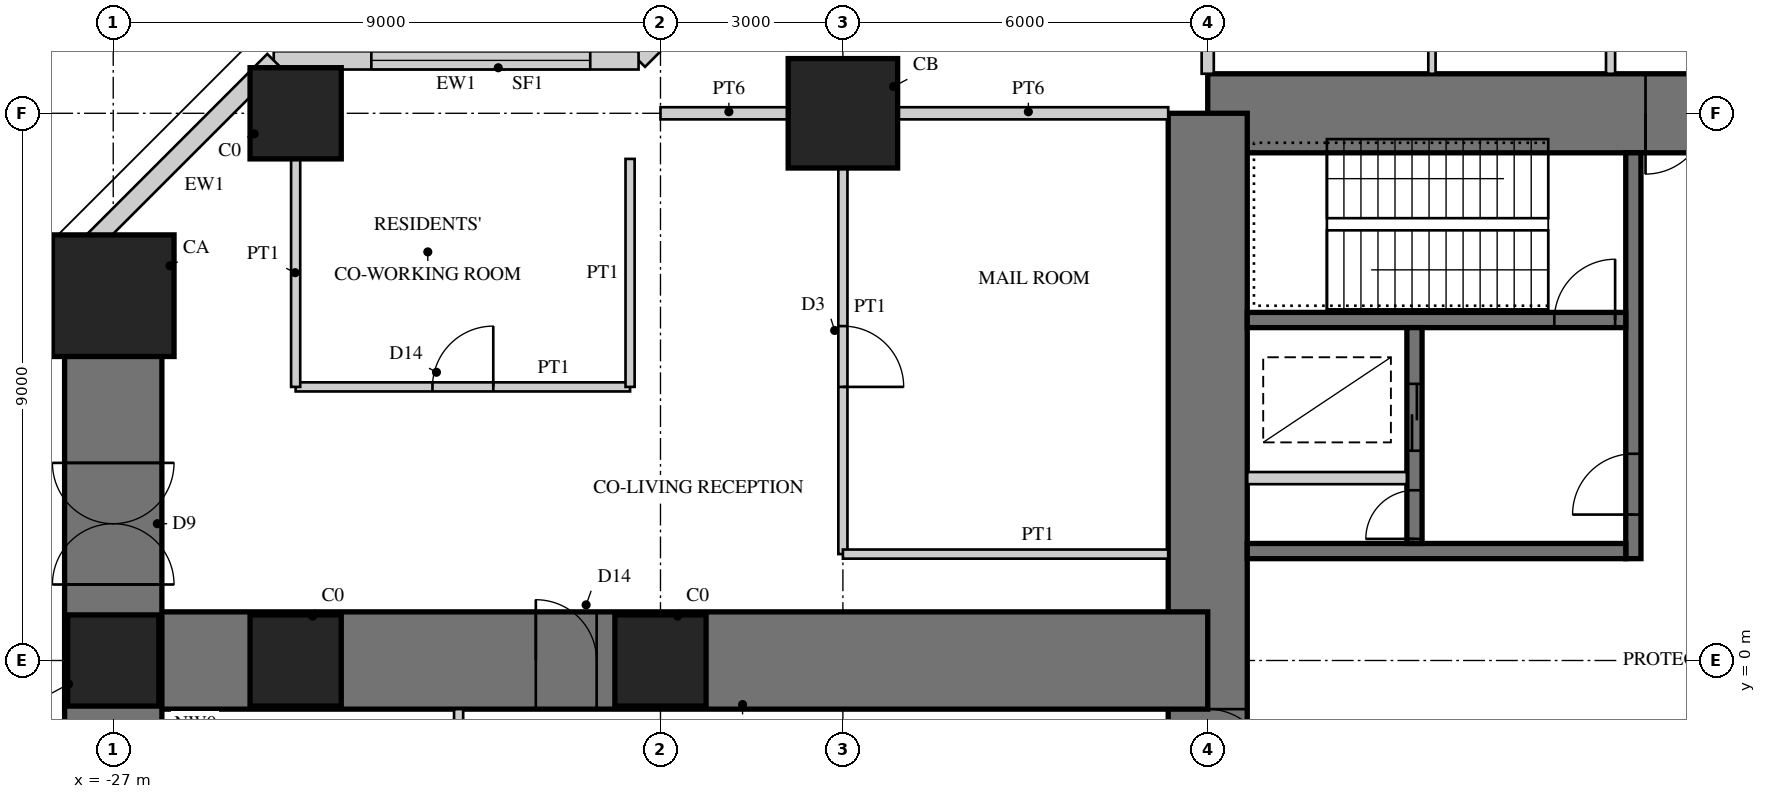
"""IFC4 building model, lengths in metres.
Left out: names, types, materials, properties, quantities, classifications, styles, units other than length and angle.
Written with IfcOpenShell. Run it as: python <this file> out.ifc"""

import sys

from ifc_helpers import new_model, si_unit, direction, frame, frame_2d, origin, origin_2d, place, context, subcontext, project, spatial, rectangle, hollow_rectangle, extrude, element, fill, save


model = new_model("IFC4")
c1 = context("Model", 3, precision=1e-05, world=origin(), true_north=direction((0.0, 1.0)))
c2 = subcontext(c1, "Body", "Model", "MODEL_VIEW")
j1 = project(units=[si_unit("LENGTHUNIT", "METRE"), si_unit("PLANEANGLEUNIT", "RADIAN")], contexts=[c1])
p1 = place(None, origin())
s1 = spatial("IfcSite", under=j1, at=p1, CompositionType="ELEMENT")
p2 = place(p1, origin())
s2 = spatial("IfcBuilding", under=s1, at=p2, CompositionType="ELEMENT")
p3 = place(p2, origin())
s3 = spatial("IfcBuildingStorey", under=s2, at=p3, CompositionType="ELEMENT", Elevation=0.0)
p4 = place(p3, frame((9.0, 9.0, 0.0), z_axis=(0.0, 0.0, 1.0), x_axis=(-1.0, 0.0, 0.0)))
e1 = element("IfcWall", 1, at=p4, inside=s3, PredefinedType="SHEAR", context=c2, shape_type="SweptSolid", body=[
    extrude(rectangle(XDim=18.0, YDim=1.3, at=frame_2d((9.0, 0.0))), origin(), (0.0, 0.0, 1.0), 5.0),
])
p5 = place(p4, frame((9.8, 0.0, 0.0)))
e2 = element("IfcOpeningElement", 2, at=p5, cuts=e1, PredefinedType="OPENING", context=c2, shape_type="SweptSolid", body=[
    extrude(rectangle(XDim=1.0, YDim=2.4, at=frame_2d((0.5, 1.2))), frame((0.0, 0.66, 0.0), z_axis=(0.0, -1.0, 0.0), x_axis=(1.0, 0.0, 0.0)), (0.0, 0.0, 1.0), 1.32),
])
p6 = place(p3, frame((-9.0, 9.0, 0.0), z_axis=(0.0, 0.0, 1.0), x_axis=(0.0, -1.0, 0.0)))
e3 = element("IfcWall", 3, at=p6, inside=s3, PredefinedType="SHEAR", context=c2, shape_type="SweptSolid", body=[
    extrude(rectangle(XDim=18.0, YDim=1.3, at=frame_2d((9.0, 0.0))), origin(), (0.0, 0.0, 1.0), 5.0),
])
p7 = place(p6, frame((9.8, 0.0, 0.0)))
e4 = element("IfcOpeningElement", 4, at=p7, cuts=e3, PredefinedType="OPENING", context=c2, shape_type="SweptSolid", body=[
    extrude(rectangle(XDim=1.0, YDim=2.4, at=frame_2d((0.5, 1.2))), frame((0.0, 0.66, 0.0), z_axis=(0.0, -1.0, 0.0), x_axis=(1.0, 0.0, 0.0)), (0.0, 0.0, 1.0), 1.32),
])
p8 = place(p3, frame((-2.0, 1.675, 0.0), z_axis=(0.0, 0.0, 1.0), x_axis=(0.0, 1.0, 0.0)))
e5 = element("IfcWall", 5, at=p8, inside=s3, PredefinedType="SHEAR", context=c2, shape_type="SweptSolid", body=[
    extrude(rectangle(XDim=6.675, YDim=0.25, at=frame_2d((3.337, 0.0))), origin(), (0.0, 0.0, 1.0), 5.0),
])
p9 = place(p8, frame((0.725, 0.0, 0.0)))
e6 = element("IfcOpeningElement", 6, at=p9, cuts=e5, PredefinedType="OPENING", context=c2, shape_type="SweptSolid", body=[
    extrude(rectangle(XDim=1.0, YDim=2.1, at=frame_2d((0.5, 1.05))), frame((0.0, 0.135, 0.0), z_axis=(0.0, -1.0, 0.0), x_axis=(1.0, 0.0, 0.0)), (0.0, 0.0, 1.0), 0.27),
])
p10 = place(p3, frame((-2.125, 1.8, 0.0), z_axis=(0.0, 0.0, 1.0), x_axis=(-1.0, 0.0, 0.0)))
e7 = element("IfcWall", 7, at=p10, inside=s3, PredefinedType="SHEAR", context=c2, shape_type="SweptSolid", body=[
    extrude(rectangle(XDim=6.225, YDim=0.25, at=frame_2d((3.113, 0.0))), origin(), (0.0, 0.0, 1.0), 5.0),
])
p11 = place(p3, frame((-2.125, 5.6, 0.0), z_axis=(0.0, 0.0, 1.0), x_axis=(-1.0, 0.0, 0.0)))
e8 = element("IfcWall", 8, at=p11, inside=s3, PredefinedType="SHEAR", context=c2, shape_type="SweptSolid", body=[
    extrude(rectangle(XDim=6.225, YDim=0.25, at=frame_2d((3.113, 0.0))), origin(), (0.0, 0.0, 1.0), 5.0),
])
p12 = place(p11, frame((0.175, 0.0, 0.0)))
e9 = element("IfcOpeningElement", 9, at=p12, cuts=e8, PredefinedType="OPENING", context=c2, shape_type="SweptSolid", body=[
    extrude(rectangle(XDim=1.0, YDim=2.1, at=frame_2d((0.5, 1.05))), frame((0.0, 0.135, 0.0), z_axis=(0.0, -1.0, 0.0), x_axis=(1.0, 0.0, 0.0)), (0.0, 0.0, 1.0), 0.27),
])
p13 = place(p3, frame((-5.6, 1.925, 0.0), z_axis=(0.0, 0.0, 1.0), x_axis=(0.0, 1.0, 0.0)))
e10 = element("IfcWall", 10, at=p13, inside=s3, PredefinedType="SHEAR", context=c2, shape_type="SweptSolid", body=[
    extrude(rectangle(XDim=3.55, YDim=0.25, at=frame_2d((1.775, 0.0))), origin(), (0.0, 0.0, 1.0), 5.0),
])
p14 = place(p13, frame((1.525, 0.0, 0.0)))
e11 = element("IfcOpeningElement", 11, at=p14, cuts=e10, PredefinedType="OPENING", context=c2, shape_type="SweptSolid", body=[
    extrude(rectangle(XDim=1.1, YDim=2.2, at=frame_2d((0.55, 1.1))), frame((0.0, 0.135, 0.0), z_axis=(0.0, -1.0, 0.0), x_axis=(1.0, 0.0, 0.0)), (0.0, 0.0, 1.0), 0.27),
])
p15 = place(p13, frame((0.075, 0.0, 0.0)))
e12 = element("IfcOpeningElement", 12, at=p15, cuts=e10, PredefinedType="OPENING", context=c2, shape_type="SweptSolid", body=[
    extrude(rectangle(XDim=0.8, YDim=2.1, at=frame_2d((0.4, 1.05))), frame((0.0, 0.135, 0.0), z_axis=(0.0, -1.0, 0.0), x_axis=(1.0, 0.0, 0.0)), (0.0, 0.0, 1.0), 0.27),
])
p16 = place(p3, frame((-5.725, 3.0, 0.0), z_axis=(0.0, 0.0, 1.0), x_axis=(-1.0, 0.0, 0.0)))
e13 = element("IfcWall", 13, at=p16, inside=s3, PredefinedType="PARTITIONING", context=c2, shape_type="SweptSolid", body=[
    extrude(rectangle(XDim=2.625, YDim=0.2, at=frame_2d((1.312, 0.0))), origin(), (0.0, 0.0, 1.0), 5.0),
])
p17 = place(p3, frame((-9.0, 0.0, 0.0), z_axis=(0.0, 0.0, 1.0), x_axis=(-1.0, 0.0, 0.0)))
e14 = element("IfcWall", 14, at=p17, inside=s3, PredefinedType="SHEAR", context=c2, shape_type="SweptSolid", body=[
    extrude(rectangle(XDim=18.0, YDim=1.6, at=frame_2d((9.0, 0.0))), origin(), (0.0, 0.0, 1.0), 5.0),
])
p18 = place(p17, frame((10.05, 0.0, 0.0)))
e15 = element("IfcOpeningElement", 15, at=p18, cuts=e14, PredefinedType="OPENING", context=c2, shape_type="SweptSolid", body=[
    extrude(rectangle(XDim=1.0, YDim=2.2, at=frame_2d((0.5, 1.1))), frame((0.0, 0.81, 0.0), z_axis=(0.0, -1.0, 0.0), x_axis=(1.0, 0.0, 0.0)), (0.0, 0.0, 1.0), 1.62),
])
p19 = place(p3, frame((-27.0, 6.0, 0.0), z_axis=(0.0, 0.0, 1.0), x_axis=(0.0, -1.0, 0.0)))
e16 = element("IfcWall", 16, at=p19, inside=s3, PredefinedType="SHEAR", context=c2, shape_type="SweptSolid", body=[
    extrude(rectangle(XDim=12.0, YDim=1.6, at=frame_2d((6.0, 0.0))), origin(), (0.0, 0.0, 1.0), 5.0),
])
p20 = place(p19, frame((2.75, 0.0, 0.0)))
e17 = element("IfcOpeningElement", 17, at=p20, cuts=e16, PredefinedType="OPENING", context=c2, shape_type="SweptSolid", body=[
    extrude(rectangle(XDim=2.0, YDim=2.6, at=frame_2d((1.0, 1.3))), frame((0.0, 0.81, 0.0), z_axis=(0.0, -1.0, 0.0), x_axis=(1.0, 0.0, 0.0)), (0.0, 0.0, 1.0), 1.62),
])
p21 = place(p19, frame((7.6, 0.0, 0.6)))
e18 = element("IfcOpeningElement", 18, at=p21, cuts=e16, PredefinedType="OPENING", context=c2, shape_type="SweptSolid", body=[
    extrude(rectangle(XDim=2.4, YDim=3.0, at=frame_2d((1.2, 1.5))), frame((0.0, 0.81, 0.0), z_axis=(0.0, -1.0, 0.0), x_axis=(1.0, 0.0, 0.0)), (0.0, 0.0, 1.0), 1.62),
])
p22 = place(p3, frame((-15.0, 9.0, 0.0), z_axis=(0.0, 0.0, 1.0), x_axis=(1.0, 0.0, 0.0)))
e19 = element("IfcColumn", 19, at=p22, inside=s3, PredefinedType="COLUMN", context=c2, shape_type="SweptSolid", body=[
    extrude(rectangle(XDim=1.8, YDim=1.8, at=origin_2d()), origin(), (0.0, 0.0, 1.0), 5.0),
])
p23 = place(p3, frame((-24.0, 9.0, 0.0), z_axis=(0.0, 0.0, 1.0), x_axis=(1.0, 0.0, 0.0)))
e20 = element("IfcColumn", 20, at=p23, inside=s3, PredefinedType="COLUMN", context=c2, shape_type="SweptSolid", body=[
    extrude(rectangle(XDim=1.5, YDim=1.5, at=origin_2d()), origin(), (0.0, 0.0, 1.0), 5.0),
])
p24 = place(p3, frame((-27.0, 6.0, 0.0), z_axis=(0.0, 0.0, 1.0), x_axis=(1.0, 0.0, 0.0)))
e21 = element("IfcColumn", 21, at=p24, inside=s3, PredefinedType="COLUMN", context=c2, shape_type="SweptSolid", body=[
    extrude(rectangle(XDim=2.0, YDim=2.0, at=origin_2d()), origin(), (0.0, 0.0, 1.0), 5.0),
])
for number, where, z_axis, x_axis in (
    (22, (-27.0, 0.0, 0.0), (0.0, 0.0, 1.0), (1.0, 0.0, 0.0)),
    (23, (-18.0, 0.0, 0.0), (0.0, 0.0, 1.0), (1.0, 0.0, 0.0)),
    (24, (-24.0, 0.0, 0.0), (0.0, 0.0, 1.0), (1.0, 0.0, 0.0)),
):
    element("IfcColumn", number, at=place(p3, frame(where, z_axis=z_axis, x_axis=x_axis)), inside=s3, PredefinedType="COLUMN", context=c2, shape_type="SweptSolid", body=[
        extrude(rectangle(XDim=1.5, YDim=1.5, at=origin_2d()), origin(), (0.0, 0.0, 1.0), 5.0),
    ])
p25 = place(p3, frame((-9.87, 18.36, 0.0), z_axis=(0.0, 0.0, 1.0), x_axis=(-0.707106781187, -0.707106781187, 0.0)))
e25 = element("IfcWall", 25, at=p25, inside=s3, PredefinedType="SOLIDWALL", context=c2, shape_type="SweptSolid", body=[
    extrude(rectangle(XDim=12.007, YDim=0.3, at=frame_2d((6.003, 0.0))), origin(), (0.0, 0.0, 1.0), 4.8),
])
p26 = place(p25, frame((1.204, 0.0, 0.0)))
e26 = element("IfcOpeningElement", 26, at=p26, cuts=e25, PredefinedType="OPENING", context=c2, shape_type="SweptSolid", body=[
    extrude(rectangle(XDim=3.6, YDim=4.2, at=frame_2d((1.8, 2.1))), frame((0.0, 0.16, 0.0), z_axis=(0.0, -1.0, 0.0), x_axis=(1.0, 0.0, 0.0)), (0.0, 0.0, 1.0), 0.32),
])
p27 = place(p3, frame((-18.36, 9.87, 0.0), z_axis=(0.0, 0.0, 1.0), x_axis=(-1.0, 0.0, 0.0)))
e27 = element("IfcWall", 27, at=p27, inside=s3, PredefinedType="SOLIDWALL", context=c2, shape_type="SweptSolid", body=[
    extrude(rectangle(XDim=6.0, YDim=0.3, at=frame_2d((3.0, 0.0))), origin(), (0.0, 0.0, 1.0), 4.8),
])
p28 = place(p27, frame((0.795, 0.0, 0.3)))
e28 = element("IfcOpeningElement", 28, at=p28, cuts=e27, PredefinedType="OPENING", context=c2, shape_type="SweptSolid", body=[
    extrude(rectangle(XDim=3.6, YDim=3.9, at=frame_2d((1.8, 1.95))), frame((0.0, 0.16, 0.0), z_axis=(0.0, -1.0, 0.0), x_axis=(1.0, 0.0, 0.0)), (0.0, 0.0, 1.0), 0.32),
])
p29 = place(p3, frame((-24.36, 9.87, 0.0), z_axis=(0.0, 0.0, 1.0), x_axis=(-0.707106781187, -0.707106781187, 0.0)))
e29 = element("IfcWall", 29, at=p29, inside=s3, PredefinedType="SOLIDWALL", context=c2, shape_type="SweptSolid", body=[
    extrude(rectangle(XDim=4.865, YDim=0.3, at=frame_2d((2.432, 0.0))), origin(), (0.0, 0.0, 1.0), 4.8),
])
p30 = place(p3, frame((-2.375, 9.65, 0.0), z_axis=(0.0, 0.0, 1.0), x_axis=(0.0, 1.0, 0.0)))
e30 = element("IfcWall", 30, at=p30, inside=s3, PredefinedType="PARTITIONING", context=c2, shape_type="SweptSolid", body=[
    extrude(rectangle(XDim=5.35, YDim=0.15, at=frame_2d((2.675, 0.0))), origin(), (0.0, 0.0, 1.0), 4.8),
])
p31 = place(p3, frame((-5.312, 9.65, 0.0), z_axis=(0.0, 0.0, 1.0), x_axis=(0.0, 1.0, 0.0)))
e31 = element("IfcWall", 31, at=p31, inside=s3, PredefinedType="PLUMBINGWALL", context=c2, shape_type="SweptSolid", body=[
    extrude(rectangle(XDim=5.25, YDim=0.12, at=frame_2d((2.625, 0.0))), origin(), (0.0, 0.0, 1.0), 4.8),
])
p32 = place(p3, frame((-15.0, 8.25, 0.0), z_axis=(0.0, 0.0, 1.0), x_axis=(0.0, -1.0, 0.0)))
e32 = element("IfcWall", 32, at=p32, inside=s3, PredefinedType="PARTITIONING", context=c2, shape_type="SweptSolid", body=[
    extrude(rectangle(XDim=6.5, YDim=0.15, at=frame_2d((3.25, 0.0))), origin(), (0.0, 0.0, 1.0), 3.85),
])
p33 = place(p32, frame((2.75, 0.0, 0.0)))
e33 = element("IfcOpeningElement", 33, at=p33, cuts=e32, PredefinedType="OPENING", context=c2, shape_type="SweptSolid", body=[
    extrude(rectangle(XDim=1.0, YDim=2.1, at=frame_2d((0.5, 1.05))), frame((0.0, 0.085, 0.0), z_axis=(0.0, -1.0, 0.0), x_axis=(1.0, 0.0, 0.0)), (0.0, 0.0, 1.0), 0.17),
])
p34 = place(p3, frame((-9.65, 1.75, 0.0), z_axis=(0.0, 0.0, 1.0), x_axis=(-1.0, 0.0, 0.0)))
e34 = element("IfcWall", 34, at=p34, inside=s3, PredefinedType="PARTITIONING", context=c2, shape_type="SweptSolid", body=[
    extrude(rectangle(XDim=5.35, YDim=0.15, at=frame_2d((2.675, 0.0))), origin(), (0.0, 0.0, 1.0), 4.8),
])
p35 = place(p3, frame((-21.32, -0.8, 0.0), z_axis=(0.0, 0.0, 1.0), x_axis=(0.0, -1.0, 0.0)))
e35 = element("IfcWall", 35, at=p35, inside=s3, PredefinedType="PARTITIONING", context=c2, shape_type="SweptSolid", body=[
    extrude(rectangle(XDim=8.92, YDim=0.15, at=frame_2d((4.46, 0.0))), origin(), (0.0, 0.0, 1.0), 4.8),
])
p36 = place(p35, frame((0.45, 0.0, 0.0)))
e36 = element("IfcOpeningElement", 36, at=p36, cuts=e35, PredefinedType="OPENING", context=c2, shape_type="SweptSolid", body=[
    extrude(rectangle(XDim=1.0, YDim=2.2, at=frame_2d((0.5, 1.1))), frame((0.0, 0.085, 0.0), z_axis=(0.0, -1.0, 0.0), x_axis=(1.0, 0.0, 0.0)), (0.0, 0.0, 1.0), 0.17),
])
p37 = place(p3, frame((-18.5, 4.5, 0.0), z_axis=(0.0, 0.0, 1.0), x_axis=(-1.0, 0.0, 0.0)))
e37 = element("IfcWall", 37, at=p37, inside=s3, PredefinedType="PARTITIONING", context=c2, shape_type="SweptSolid", body=[
    extrude(rectangle(XDim=5.5, YDim=0.15, at=frame_2d((2.75, 0.0))), origin(), (0.0, 0.0, 1.0), 4.8),
])
p38 = place(p37, frame((2.25, 0.0, 0.0)))
e38 = element("IfcOpeningElement", 38, at=p38, cuts=e37, PredefinedType="OPENING", context=c2, shape_type="SweptSolid", body=[
    extrude(rectangle(XDim=1.0, YDim=2.2, at=frame_2d((0.5, 1.1))), frame((0.0, 0.085, 0.0), z_axis=(0.0, -1.0, 0.0), x_axis=(1.0, 0.0, 0.0)), (0.0, 0.0, 1.0), 0.17),
])
p39 = place(p3, frame((-18.5, 8.25, 0.0), z_axis=(0.0, 0.0, 1.0), x_axis=(0.0, -1.0, 0.0)))
e39 = element("IfcWall", 39, at=p39, inside=s3, PredefinedType="PARTITIONING", context=c2, shape_type="SweptSolid", body=[
    extrude(rectangle(XDim=3.75, YDim=0.15, at=frame_2d((1.875, 0.0))), origin(), (0.0, 0.0, 1.0), 4.8),
])
p40 = place(p3, frame((-24.0, 8.25, 0.0), z_axis=(0.0, 0.0, 1.0), x_axis=(0.0, -1.0, 0.0)))
e40 = element("IfcWall", 40, at=p40, inside=s3, PredefinedType="PARTITIONING", context=c2, shape_type="SweptSolid", body=[
    extrude(rectangle(XDim=3.75, YDim=0.15, at=frame_2d((1.875, 0.0))), origin(), (0.0, 0.0, 1.0), 3.85),
])
p41 = place(p3, frame((-9.0, 9.65, 0.0), z_axis=(0.0, 0.0, 1.0), x_axis=(0.0, 1.0, 0.0)))
e41 = element("IfcWall", 41, at=p41, inside=s3, PredefinedType="SOLIDWALL", context=c2, shape_type="SweptSolid", body=[
    extrude(rectangle(XDim=4.6, YDim=0.2, at=frame_2d((2.3, 0.0))), origin(), (0.0, 0.0, 1.0), 3.8),
])
p42 = place(p41, frame((1.2, 0.0, 0.0)))
e42 = element("IfcOpeningElement", 42, at=p42, cuts=e41, PredefinedType="OPENING", context=c2, shape_type="SweptSolid", body=[
    extrude(rectangle(XDim=1.0, YDim=2.2, at=frame_2d((0.5, 1.1))), frame((0.0, 0.11, 0.0), z_axis=(0.0, -1.0, 0.0), x_axis=(1.0, 0.0, 0.0)), (0.0, 0.0, 1.0), 0.22),
])
p43 = place(p3, frame((-14.25, 9.0, 0.0), z_axis=(0.0, 0.0, 1.0), x_axis=(1.0, 0.0, 0.0)))
e43 = element("IfcWall", 43, at=p43, inside=s3, PredefinedType="SOLIDWALL", context=c2, shape_type="SweptSolid", body=[
    extrude(rectangle(XDim=4.6, YDim=0.2, at=frame_2d((2.3, 0.0))), origin(), (0.0, 0.0, 1.0), 3.8),
])
p44 = place(p3, frame((-18.0, 9.0, 0.0), z_axis=(0.0, 0.0, 1.0), x_axis=(1.0, 0.0, 0.0)))
e44 = element("IfcWall", 44, at=p44, inside=s3, PredefinedType="SOLIDWALL", context=c2, shape_type="SweptSolid", body=[
    extrude(rectangle(XDim=2.25, YDim=0.2, at=frame_2d((1.125, 0.0))), origin(), (0.0, 0.0, 1.0), 3.8),
])
p45 = place(p28, origin())
e45 = element("IfcWindow", 45, at=p45, inside=s3, PartitioningType="SINGLE_PANEL", PredefinedType="WINDOW", context=c2, shape_type="SweptSolid", body=[
    extrude(hollow_rectangle(XDim=3.6, YDim=3.9, WallThickness=0.06, at=frame_2d((1.8, 1.95))), frame((0.0, 0.03, 0.0), z_axis=(0.0, -1.0, 0.0), x_axis=(1.0, 0.0, 0.0)), (0.0, 0.0, 1.0), 0.06),
    extrude(rectangle(XDim=3.479, YDim=3.779, at=frame_2d((1.8, 1.95))), frame((0.0, 0.03, 0.0), z_axis=(0.0, -1.0, 0.0), x_axis=(1.0, 0.0, 0.0)), (0.0, 0.0, 1.0), 0.06),
])
fill(e28, e45)
p46 = place(p20, origin())
e46 = element("IfcDoor", 46, at=p46, inside=s3, OperationType="DOUBLE_DOOR_DOUBLE_SWING", PredefinedType="DOOR", context=c2, shape_type="SweptSolid", body=[
    extrude(hollow_rectangle(XDim=2.0, YDim=2.6, WallThickness=0.06, at=frame_2d((1.0, 1.3))), frame((0.0, 0.025, 0.0), z_axis=(0.0, -1.0, 0.0), x_axis=(1.0, 0.0, 0.0)), (0.0, 0.0, 1.0), 0.05),
    extrude(rectangle(XDim=1.879, YDim=2.479, at=frame_2d((1.0, 1.3))), frame((0.0, 0.025, 0.0), z_axis=(0.0, -1.0, 0.0), x_axis=(1.0, 0.0, 0.0)), (0.0, 0.0, 1.0), 0.05),
])
fill(e17, e46)
p47 = place(p33, origin())
e47 = element("IfcDoor", 47, at=p47, inside=s3, OperationType="SINGLE_SWING_RIGHT", PredefinedType="DOOR", context=c2, shape_type="SweptSolid", body=[
    extrude(rectangle(XDim=1.0, YDim=2.1, at=frame_2d((0.5, 1.05))), frame((0.0, 0.025, 0.0), z_axis=(0.0, -1.0, 0.0), x_axis=(1.0, 0.0, 0.0)), (0.0, 0.0, 1.0), 0.05),
])
fill(e33, e47)
p48 = place(p38, frame((1.0, 0.0, 0.0), z_axis=(0.0, 0.0, 1.0), x_axis=(-1.0, 0.0, 0.0)))
e48 = element("IfcDoor", 48, at=p48, inside=s3, OperationType="SINGLE_SWING_RIGHT", PredefinedType="DOOR", context=c2, shape_type="SweptSolid", body=[
    extrude(rectangle(XDim=1.0, YDim=2.2, at=frame_2d((0.5, 1.1))), frame((0.0, 0.025, 0.0), z_axis=(0.0, -1.0, 0.0), x_axis=(1.0, 0.0, 0.0)), (0.0, 0.0, 1.0), 0.05),
])
fill(e38, e48)
p49 = place(p18, frame((1.0, 0.0, 0.0), z_axis=(0.0, 0.0, 1.0), x_axis=(-1.0, 0.0, 0.0)))
e49 = element("IfcDoor", 49, at=p49, inside=s3, OperationType="SINGLE_SWING_LEFT", PredefinedType="DOOR", context=c2, shape_type="SweptSolid", body=[
    extrude(rectangle(XDim=1.0, YDim=2.2, at=frame_2d((0.5, 1.1))), frame((0.0, 0.025, 0.0), z_axis=(0.0, -1.0, 0.0), x_axis=(1.0, 0.0, 0.0)), (0.0, 0.0, 1.0), 0.05),
])
fill(e15, e49)
p50 = place(p5, origin())
e50 = element("IfcDoor", 50, at=p50, inside=s3, OperationType="SINGLE_SWING_RIGHT", PredefinedType="DOOR", context=c2, shape_type="SweptSolid", body=[
    extrude(rectangle(XDim=1.0, YDim=2.4, at=frame_2d((0.5, 1.2))), frame((0.0, 0.055, 0.0), z_axis=(0.0, -1.0, 0.0), x_axis=(1.0, 0.0, 0.0)), (0.0, 0.0, 1.0), 0.05),
])
fill(e2, e50)
p51 = place(p7, origin())
e51 = element("IfcDoor", 51, at=p51, inside=s3, OperationType="SINGLE_SWING_RIGHT", PredefinedType="DOOR", context=c2, shape_type="SweptSolid", body=[
    extrude(rectangle(XDim=1.0, YDim=2.4, at=frame_2d((0.5, 1.2))), frame((0.0, 0.055, 0.0), z_axis=(0.0, -1.0, 0.0), x_axis=(1.0, 0.0, 0.0)), (0.0, 0.0, 1.0), 0.05),
])
fill(e4, e51)
p52 = place(p9, origin())
e52 = element("IfcDoor", 52, at=p52, inside=s3, OperationType="SINGLE_SWING_LEFT", PredefinedType="DOOR", context=c2, shape_type="SweptSolid", body=[
    extrude(rectangle(XDim=1.0, YDim=2.1, at=frame_2d((0.5, 1.05))), frame((0.0, 0.025, 0.0), z_axis=(0.0, -1.0, 0.0), x_axis=(1.0, 0.0, 0.0)), (0.0, 0.0, 1.0), 0.05),
])
fill(e6, e52)
p53 = place(p12, frame((1.0, 0.0, 0.0), z_axis=(0.0, 0.0, 1.0), x_axis=(-1.0, 0.0, 0.0)))
e53 = element("IfcDoor", 53, at=p53, inside=s3, OperationType="SINGLE_SWING_RIGHT", PredefinedType="DOOR", context=c2, shape_type="SweptSolid", body=[
    extrude(rectangle(XDim=1.0, YDim=2.1, at=frame_2d((0.5, 1.05))), frame((0.0, 0.025, 0.0), z_axis=(0.0, -1.0, 0.0), x_axis=(1.0, 0.0, 0.0)), (0.0, 0.0, 1.0), 0.05),
])
fill(e9, e53)
p54 = place(p14, origin())
e54 = element("IfcDoor", 54, at=p54, inside=s3, OperationType="DOUBLE_DOOR_SLIDING", PredefinedType="DOOR", context=c2, shape_type="SweptSolid", body=[
    extrude(rectangle(XDim=1.1, YDim=2.2, at=frame_2d((0.55, 1.1))), frame((0.0, 0.025, 0.0), z_axis=(0.0, -1.0, 0.0), x_axis=(1.0, 0.0, 0.0)), (0.0, 0.0, 1.0), 0.05),
])
fill(e11, e54)
p55 = place(p15, origin())
e55 = element("IfcDoor", 55, at=p55, inside=s3, OperationType="SINGLE_SWING_LEFT", PredefinedType="DOOR", context=c2, shape_type="SweptSolid", body=[
    extrude(rectangle(XDim=0.8, YDim=2.1, at=frame_2d((0.4, 1.05))), frame((0.0, 0.025, 0.0), z_axis=(0.0, -1.0, 0.0), x_axis=(1.0, 0.0, 0.0)), (0.0, 0.0, 1.0), 0.05),
])
fill(e12, e55)
save(model, sys.argv[1])
